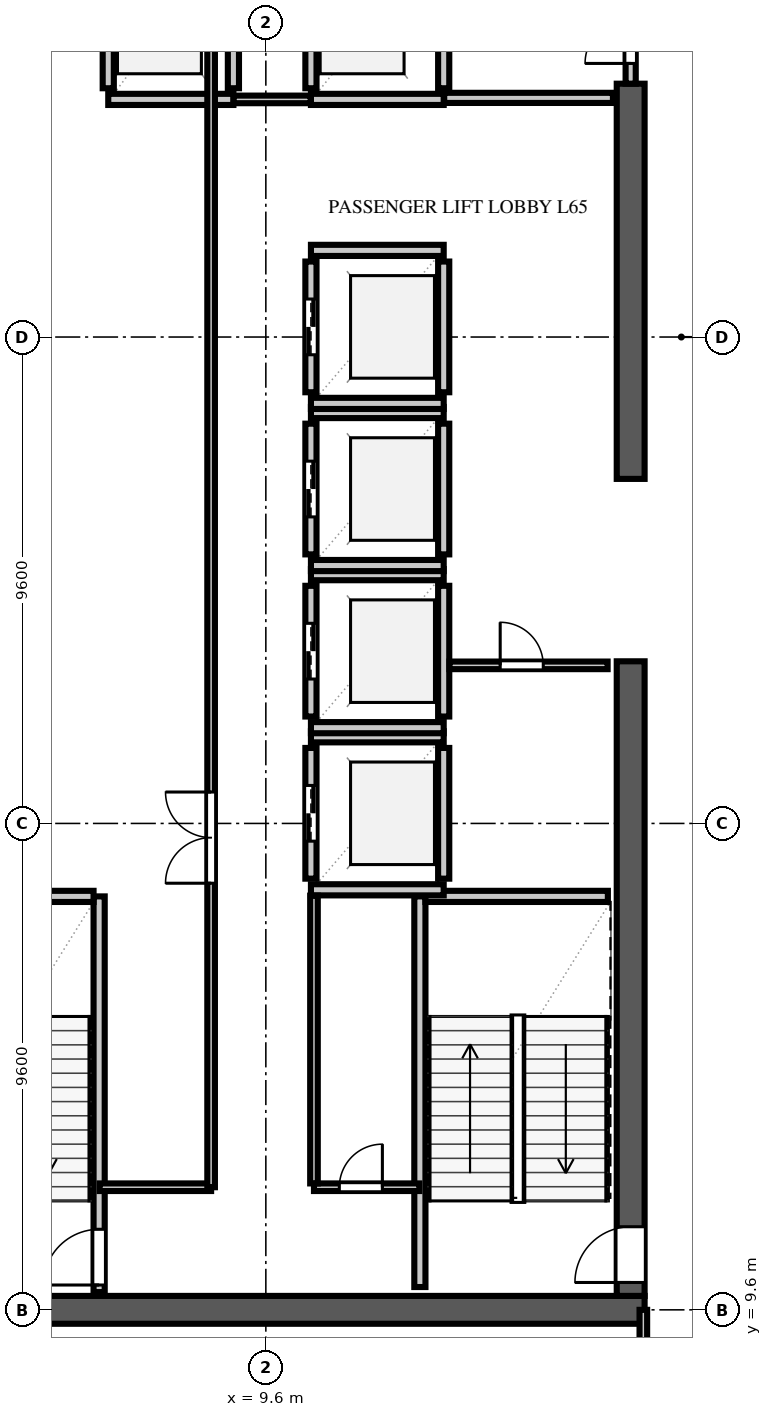
"""IFC4 building model, lengths in metres.
Left out: names, types, materials, properties, quantities, classifications, styles, units other than length and angle.
Written with IfcOpenShell. Run it as: python <this file> out.ifc"""

import sys

from ifc_helpers import new_model, si_unit, direction, frame, frame_2d, origin, place, context, subcontext, project, spatial, rectangle, extrude, element, fill, save


model = new_model("IFC4")
c1 = context("Model", 3, precision=1e-05, world=origin(), true_north=direction((0.0, 1.0)))
c2 = subcontext(c1, "Body", "Model", "MODEL_VIEW")
j1 = project(units=[si_unit("LENGTHUNIT", "METRE"), si_unit("PLANEANGLEUNIT", "RADIAN")], contexts=[c1])
p1 = place(None, origin())
s1 = spatial("IfcSite", under=j1, at=p1, CompositionType="ELEMENT")
p2 = place(p1, origin())
s2 = spatial("IfcBuilding", under=s1, at=p2, CompositionType="ELEMENT")
p3 = place(p2, frame((0.0, 0.0, 256.0)))
s3 = spatial("IfcBuildingStorey", under=s2, at=p3, CompositionType="ELEMENT", Elevation=256.0)
p4 = place(p3, frame((2.475, 9.6, 0.0), z_axis=(0.0, 0.0, 1.0), x_axis=(1.0, 0.0, 0.0)))
e1 = element("IfcWall", 1, at=p4, inside=s3, PredefinedType="SHEAR", context=c2, shape_type="SweptSolid", body=[
    extrude(rectangle(XDim=14.6, YDim=0.55, at=frame_2d((7.3, 0.0))), origin(), (0.0, 0.0, 1.0), 4.74),
])
p5 = place(p3, frame((16.8, 9.875, 0.0), z_axis=(0.0, 0.0, 1.0), x_axis=(0.0, 1.0, 0.0)))
e2 = element("IfcWall", 2, at=p5, inside=s3, PredefinedType="SHEAR", context=c2, shape_type="SweptSolid", body=[
    extrude(rectangle(XDim=12.525, YDim=0.55, at=frame_2d((6.262, 0.0))), origin(), (0.0, 0.0, 1.0), 4.74),
])
p6 = place(p5, frame((0.265, 0.0, 0.0)))
e3 = element("IfcOpeningElement", 3, at=p6, cuts=e2, PredefinedType="OPENING", context=c2, shape_type="SweptSolid", body=[
    extrude(rectangle(XDim=1.1, YDim=2.2, at=frame_2d((0.55, 1.1))), frame((0.0, 0.287, 0.0), z_axis=(0.0, -1.0, 0.0), x_axis=(1.0, 0.0, 0.0)), (0.0, 0.0, 1.0), 0.574),
])
p7 = place(p3, frame((16.8, 26.0, 0.0), z_axis=(0.0, 0.0, 1.0), x_axis=(0.0, 1.0, 0.0)))
e4 = element("IfcWall", 4, at=p7, inside=s3, PredefinedType="SHEAR", context=c2, shape_type="SweptSolid", body=[
    extrude(rectangle(XDim=7.8, YDim=0.55, at=frame_2d((3.9, 0.0))), origin(), (0.0, 0.0, 1.0), 4.74),
])
p8 = place(p3, frame((6.31, 9.95, 0.0), z_axis=(0.0, 0.0, 1.0), x_axis=(0.0, 1.0, 0.0)))
e5 = element("IfcWall", 5, at=p8, inside=s3, PredefinedType="SOLIDWALL", context=c2, shape_type="SweptSolid", body=[
    extrude(rectangle(XDim=7.81, YDim=0.22, at=frame_2d((3.905, 0.0))), origin(), (0.0, 0.0, 1.0), 4.74),
])
p9 = place(p8, frame((0.14, 0.0, 0.0)))
e6 = element("IfcOpeningElement", 6, at=p9, cuts=e5, PredefinedType="OPENING", context=c2, shape_type="SweptSolid", body=[
    extrude(rectangle(XDim=1.1, YDim=2.2, at=frame_2d((0.55, 1.1))), frame((0.0, 0.122, 0.0), z_axis=(0.0, -1.0, 0.0), x_axis=(1.0, 0.0, 0.0)), (0.0, 0.0, 1.0), 0.244),
])
p10 = place(p3, frame((2.65, 17.76, 0.0), z_axis=(0.0, 0.0, 1.0), x_axis=(1.0, 0.0, 0.0)))
e7 = element("IfcWall", 7, at=p10, inside=s3, PredefinedType="SOLIDWALL", context=c2, shape_type="SweptSolid", body=[
    extrude(rectangle(XDim=3.55, YDim=0.22, at=frame_2d((1.775, 0.0))), origin(), (0.0, 0.0, 1.0), 4.74),
])
p11 = place(p3, frame((12.64, 10.05, 0.0), z_axis=(0.0, 0.0, 1.0), x_axis=(0.0, 1.0, 0.0)))
e8 = element("IfcWall", 8, at=p11, inside=s3, PredefinedType="SOLIDWALL", context=c2, shape_type="SweptSolid", body=[
    extrude(rectangle(XDim=7.71, YDim=0.22, at=frame_2d((3.855, 0.0))), origin(), (0.0, 0.0, 1.0), 4.74),
])
p12 = place(p3, frame((12.75, 17.76, 0.0), z_axis=(0.0, 0.0, 1.0), x_axis=(1.0, 0.0, 0.0)))
e9 = element("IfcWall", 9, at=p12, inside=s3, PredefinedType="SOLIDWALL", context=c2, shape_type="SweptSolid", body=[
    extrude(rectangle(XDim=3.6, YDim=0.22, at=frame_2d((1.8, 0.0))), origin(), (0.0, 0.0, 1.0), 4.74),
])
p13 = place(p3, frame((10.49, 18.11, 0.0), z_axis=(0.0, 0.0, 1.0), x_axis=(0.0, 1.0, 0.0)))
e10 = element("IfcWall", 10, at=p13, inside=s3, PredefinedType="SOLIDWALL", context=c2, shape_type="SweptSolid", body=[
    extrude(rectangle(XDim=2.58, YDim=0.22, at=frame_2d((1.29, 0.0))), origin(), (0.0, 0.0, 1.0), 4.74),
])
p14 = place(p13, frame((0.74, 0.0, 0.0)))
e11 = element("IfcOpeningElement", 11, at=p14, cuts=e10, PredefinedType="OPENING", context=c2, shape_type="SweptSolid", body=[
    extrude(rectangle(XDim=1.1, YDim=2.2, at=frame_2d((0.55, 1.1))), frame((0.0, 0.122, 0.0), z_axis=(0.0, -1.0, 0.0), x_axis=(1.0, 0.0, 0.0)), (0.0, 0.0, 1.0), 0.244),
])
p15 = place(p3, frame((13.11, 18.11, 0.0), z_axis=(0.0, 0.0, 1.0), x_axis=(0.0, 1.0, 0.0)))
e12 = element("IfcWall", 12, at=p15, inside=s3, PredefinedType="SOLIDWALL", context=c2, shape_type="SweptSolid", body=[
    extrude(rectangle(XDim=2.58, YDim=0.22, at=frame_2d((1.29, 0.0))), origin(), (0.0, 0.0, 1.0), 4.74),
])
for number, where, z_axis, x_axis in (
    (13, (10.49, 17.89, 0.0), (0.0, 0.0, 1.0), (1.0, 0.0, 0.0)),
    (14, (10.49, 20.91, 0.0), (0.0, 0.0, 1.0), (1.0, 0.0, 0.0)),
):
    element("IfcWall", number, at=place(p3, frame(where, z_axis=z_axis, x_axis=x_axis)), inside=s3, PredefinedType="SOLIDWALL", context=c2, shape_type="SweptSolid", body=[
        extrude(rectangle(XDim=2.62, YDim=0.22, at=frame_2d((1.31, 0.0))), origin(), (0.0, 0.0, 1.0), 4.74),
    ])
p16 = place(p3, frame((10.49, 21.31, 0.0), z_axis=(0.0, 0.0, 1.0), x_axis=(0.0, 1.0, 0.0)))
e15 = element("IfcWall", 15, at=p16, inside=s3, PredefinedType="SOLIDWALL", context=c2, shape_type="SweptSolid", body=[
    extrude(rectangle(XDim=2.58, YDim=0.22, at=frame_2d((1.29, 0.0))), origin(), (0.0, 0.0, 1.0), 4.74),
])
p17 = place(p16, frame((0.74, 0.0, 0.0)))
e16 = element("IfcOpeningElement", 16, at=p17, cuts=e15, PredefinedType="OPENING", context=c2, shape_type="SweptSolid", body=[
    extrude(rectangle(XDim=1.1, YDim=2.2, at=frame_2d((0.55, 1.1))), frame((0.0, 0.122, 0.0), z_axis=(0.0, -1.0, 0.0), x_axis=(1.0, 0.0, 0.0)), (0.0, 0.0, 1.0), 0.244),
])
p18 = place(p3, frame((13.11, 21.31, 0.0), z_axis=(0.0, 0.0, 1.0), x_axis=(0.0, 1.0, 0.0)))
e17 = element("IfcWall", 17, at=p18, inside=s3, PredefinedType="SOLIDWALL", context=c2, shape_type="SweptSolid", body=[
    extrude(rectangle(XDim=2.58, YDim=0.22, at=frame_2d((1.29, 0.0))), origin(), (0.0, 0.0, 1.0), 4.74),
])
for number, where, z_axis, x_axis in (
    (18, (10.49, 21.09, 0.0), (0.0, 0.0, 1.0), (1.0, 0.0, 0.0)),
    (19, (10.49, 24.11, 0.0), (0.0, 0.0, 1.0), (1.0, 0.0, 0.0)),
):
    element("IfcWall", number, at=place(p3, frame(where, z_axis=z_axis, x_axis=x_axis)), inside=s3, PredefinedType="SOLIDWALL", context=c2, shape_type="SweptSolid", body=[
        extrude(rectangle(XDim=2.62, YDim=0.22, at=frame_2d((1.31, 0.0))), origin(), (0.0, 0.0, 1.0), 4.74),
    ])
p19 = place(p3, frame((10.49, 24.51, 0.0), z_axis=(0.0, 0.0, 1.0), x_axis=(0.0, 1.0, 0.0)))
e20 = element("IfcWall", 20, at=p19, inside=s3, PredefinedType="SOLIDWALL", context=c2, shape_type="SweptSolid", body=[
    extrude(rectangle(XDim=2.58, YDim=0.22, at=frame_2d((1.29, 0.0))), origin(), (0.0, 0.0, 1.0), 4.74),
])
p20 = place(p19, frame((0.74, 0.0, 0.0)))
e21 = element("IfcOpeningElement", 21, at=p20, cuts=e20, PredefinedType="OPENING", context=c2, shape_type="SweptSolid", body=[
    extrude(rectangle(XDim=1.1, YDim=2.2, at=frame_2d((0.55, 1.1))), frame((0.0, 0.122, 0.0), z_axis=(0.0, -1.0, 0.0), x_axis=(1.0, 0.0, 0.0)), (0.0, 0.0, 1.0), 0.244),
])
p21 = place(p3, frame((13.11, 24.51, 0.0), z_axis=(0.0, 0.0, 1.0), x_axis=(0.0, 1.0, 0.0)))
e22 = element("IfcWall", 22, at=p21, inside=s3, PredefinedType="SOLIDWALL", context=c2, shape_type="SweptSolid", body=[
    extrude(rectangle(XDim=2.58, YDim=0.22, at=frame_2d((1.29, 0.0))), origin(), (0.0, 0.0, 1.0), 4.74),
])
for number, where, z_axis, x_axis in (
    (23, (10.49, 24.29, 0.0), (0.0, 0.0, 1.0), (1.0, 0.0, 0.0)),
    (24, (10.49, 27.31, 0.0), (0.0, 0.0, 1.0), (1.0, 0.0, 0.0)),
):
    element("IfcWall", number, at=place(p3, frame(where, z_axis=z_axis, x_axis=x_axis)), inside=s3, PredefinedType="SOLIDWALL", context=c2, shape_type="SweptSolid", body=[
        extrude(rectangle(XDim=2.62, YDim=0.22, at=frame_2d((1.31, 0.0))), origin(), (0.0, 0.0, 1.0), 4.74),
    ])
p22 = place(p3, frame((10.49, 27.71, 0.0), z_axis=(0.0, 0.0, 1.0), x_axis=(0.0, 1.0, 0.0)))
e25 = element("IfcWall", 25, at=p22, inside=s3, PredefinedType="SOLIDWALL", context=c2, shape_type="SweptSolid", body=[
    extrude(rectangle(XDim=2.58, YDim=0.22, at=frame_2d((1.29, 0.0))), origin(), (0.0, 0.0, 1.0), 4.74),
])
p23 = place(p22, frame((0.74, 0.0, 0.0)))
e26 = element("IfcOpeningElement", 26, at=p23, cuts=e25, PredefinedType="OPENING", context=c2, shape_type="SweptSolid", body=[
    extrude(rectangle(XDim=1.1, YDim=2.2, at=frame_2d((0.55, 1.1))), frame((0.0, 0.122, 0.0), z_axis=(0.0, -1.0, 0.0), x_axis=(1.0, 0.0, 0.0)), (0.0, 0.0, 1.0), 0.244),
])
p24 = place(p3, frame((13.11, 27.71, 0.0), z_axis=(0.0, 0.0, 1.0), x_axis=(0.0, 1.0, 0.0)))
e27 = element("IfcWall", 27, at=p24, inside=s3, PredefinedType="SOLIDWALL", context=c2, shape_type="SweptSolid", body=[
    extrude(rectangle(XDim=2.58, YDim=0.22, at=frame_2d((1.29, 0.0))), origin(), (0.0, 0.0, 1.0), 4.74),
])
for number, where, z_axis, x_axis in (
    (28, (10.49, 27.49, 0.0), (0.0, 0.0, 1.0), (1.0, 0.0, 0.0)),
    (29, (10.49, 30.51, 0.0), (0.0, 0.0, 1.0), (1.0, 0.0, 0.0)),
):
    element("IfcWall", number, at=place(p3, frame(where, z_axis=z_axis, x_axis=x_axis)), inside=s3, PredefinedType="SOLIDWALL", context=c2, shape_type="SweptSolid", body=[
        extrude(rectangle(XDim=2.62, YDim=0.22, at=frame_2d((1.31, 0.0))), origin(), (0.0, 0.0, 1.0), 4.74),
    ])
for number, where, z_axis, x_axis in (
    (30, (6.49, 33.71, 0.0), (0.0, 0.0, 1.0), (0.0, 1.0, 0.0)),
    (31, (8.96, 33.71, 0.0), (0.0, 0.0, 1.0), (0.0, 1.0, 0.0)),
):
    element("IfcWall", number, at=place(p3, frame(where, z_axis=z_axis, x_axis=x_axis)), inside=s3, PredefinedType="SOLIDWALL", context=c2, shape_type="SweptSolid", body=[
        extrude(rectangle(XDim=2.78, YDim=0.22, at=frame_2d((1.39, 0.0))), origin(), (0.0, 0.0, 1.0), 4.74),
    ])
p25 = place(p3, frame((6.49, 33.49, 0.0), z_axis=(0.0, 0.0, 1.0), x_axis=(1.0, 0.0, 0.0)))
e32 = element("IfcWall", 32, at=p25, inside=s3, PredefinedType="SOLIDWALL", context=c2, shape_type="SweptSolid", body=[
    extrude(rectangle(XDim=2.47, YDim=0.22, at=frame_2d((1.235, 0.0))), origin(), (0.0, 0.0, 1.0), 4.74),
])
for number, where, z_axis, x_axis in (
    (33, (10.49, 33.71, 0.0), (0.0, 0.0, 1.0), (0.0, 1.0, 0.0)),
    (34, (13.11, 33.71, 0.0), (0.0, 0.0, 1.0), (0.0, 1.0, 0.0)),
):
    element("IfcWall", number, at=place(p3, frame(where, z_axis=z_axis, x_axis=x_axis)), inside=s3, PredefinedType="SOLIDWALL", context=c2, shape_type="SweptSolid", body=[
        extrude(rectangle(XDim=2.78, YDim=0.22, at=frame_2d((1.39, 0.0))), origin(), (0.0, 0.0, 1.0), 4.74),
    ])
p26 = place(p3, frame((10.49, 33.49, 0.0), z_axis=(0.0, 0.0, 1.0), x_axis=(1.0, 0.0, 0.0)))
e35 = element("IfcWall", 35, at=p26, inside=s3, PredefinedType="SOLIDWALL", context=c2, shape_type="SweptSolid", body=[
    extrude(rectangle(XDim=2.62, YDim=0.22, at=frame_2d((1.31, 0.0))), origin(), (0.0, 0.0, 1.0), 4.74),
])
p27 = place(p3, frame((13.12, 33.52, 0.0), z_axis=(0.0, 0.0, 1.0), x_axis=(1.0, 0.0, 0.0)))
e36 = element("IfcWall", 36, at=p27, inside=s3, PredefinedType="SOLIDWALL", context=c2, shape_type="SweptSolid", body=[
    extrude(rectangle(XDim=3.33, YDim=0.2, at=frame_2d((1.665, 0.0))), origin(), (0.0, 0.0, 1.0), 4.74),
])
p28 = place(p3, frame((16.8, 33.8, 0.0), z_axis=(0.0, 0.0, 1.0), x_axis=(0.0, 1.0, 0.0)))
e37 = element("IfcWall", 37, at=p28, inside=s3, PredefinedType="SOLIDWALL", context=c2, shape_type="SweptSolid", body=[
    extrude(rectangle(XDim=2.6, YDim=0.2, at=frame_2d((1.3, 0.0))), origin(), (0.0, 0.0, 1.0), 4.74),
])
p29 = place(p28, frame((0.4, 0.0, 0.0)))
e38 = element("IfcOpeningElement", 38, at=p29, cuts=e37, PredefinedType="OPENING", context=c2, shape_type="SweptSolid", body=[
    extrude(rectangle(XDim=1.8, YDim=2.2, at=frame_2d((0.9, 1.1))), frame((0.0, 0.112, 0.0), z_axis=(0.0, -1.0, 0.0), x_axis=(1.0, 0.0, 0.0)), (0.0, 0.0, 1.0), 0.224),
])
p30 = place(p3, frame((8.965, 33.49, 0.0), z_axis=(0.0, 0.0, 1.0), x_axis=(1.0, 0.0, 0.0)))
e39 = element("IfcWall", 39, at=p30, inside=s3, PredefinedType="PARTITIONING", context=c2, shape_type="SweptSolid", body=[
    extrude(rectangle(XDim=1.52, YDim=0.15, at=frame_2d((0.76, 0.0))), origin(), (0.0, 0.0, 1.0), 4.74),
])
p31 = place(p3, frame((10.55, 12.02, 0.0), z_axis=(0.0, 0.0, 1.0), x_axis=(1.0, 0.0, 0.0)))
e40 = element("IfcWall", 40, at=p31, inside=s3, PredefinedType="PARTITIONING", context=c2, shape_type="SweptSolid", body=[
    extrude(rectangle(XDim=2.08, YDim=0.15, at=frame_2d((1.04, 0.0))), origin(), (0.0, 0.0, 1.0), 4.74),
])
p32 = place(p31, frame((0.5, 0.0, 0.0)))
e41 = element("IfcOpeningElement", 41, at=p32, cuts=e40, PredefinedType="OPENING", context=c2, shape_type="SweptSolid", body=[
    extrude(rectangle(XDim=0.85, YDim=2.1, at=frame_2d((0.425, 1.05))), frame((0.0, 0.087, 0.0), z_axis=(0.0, -1.0, 0.0), x_axis=(1.0, 0.0, 0.0)), (0.0, 0.0, 1.0), 0.174),
])
p33 = place(p3, frame((10.55, 12.095, 0.0), z_axis=(0.0, 0.0, 1.0), x_axis=(0.0, 1.0, 0.0)))
e42 = element("IfcWall", 42, at=p33, inside=s3, PredefinedType="PARTITIONING", context=c2, shape_type="SweptSolid", body=[
    extrude(rectangle(XDim=5.68, YDim=0.15, at=frame_2d((2.84, 0.0))), origin(), (0.0, 0.0, 1.0), 4.74),
])
p34 = place(p3, frame((13.225, 22.32, 0.0), z_axis=(0.0, 0.0, 1.0), x_axis=(1.0, 0.0, 0.0)))
e43 = element("IfcWall", 43, at=p34, inside=s3, PredefinedType="PARTITIONING", context=c2, shape_type="SweptSolid", body=[
    extrude(rectangle(XDim=3.12, YDim=0.15, at=frame_2d((1.56, 0.0))), origin(), (0.0, 0.0, 1.0), 4.74),
])
p35 = place(p34, frame((1.0, 0.0, 0.0)))
e44 = element("IfcOpeningElement", 44, at=p35, cuts=e43, PredefinedType="OPENING", context=c2, shape_type="SweptSolid", body=[
    extrude(rectangle(XDim=0.85, YDim=2.1, at=frame_2d((0.425, 1.05))), frame((0.0, 0.087, 0.0), z_axis=(0.0, -1.0, 0.0), x_axis=(1.0, 0.0, 0.0)), (0.0, 0.0, 1.0), 0.174),
])
p36 = place(p3, frame((6.32, 12.02, 0.0), z_axis=(0.0, 0.0, 1.0), x_axis=(1.0, 0.0, 0.0)))
e45 = element("IfcWall", 45, at=p36, inside=s3, PredefinedType="PARTITIONING", context=c2, shape_type="SweptSolid", body=[
    extrude(rectangle(XDim=2.2, YDim=0.15, at=frame_2d((1.1, 0.0))), origin(), (0.0, 0.0, 1.0), 4.74),
])
p37 = place(p3, frame((8.52, 12.02, 0.0), z_axis=(0.0, 0.0, 1.0), x_axis=(0.0, 1.0, 0.0)))
e46 = element("IfcWall", 46, at=p37, inside=s3, PredefinedType="PARTITIONING", context=c2, shape_type="SweptSolid", body=[
    extrude(rectangle(XDim=24.76, YDim=0.15, at=frame_2d((12.38, 0.0))), origin(), (0.0, 0.0, 1.0), 4.74),
])
p38 = place(p37, frame((6.0, 0.0, 0.0)))
e47 = element("IfcOpeningElement", 47, at=p38, cuts=e46, PredefinedType="OPENING", context=c2, shape_type="SweptSolid", body=[
    extrude(rectangle(XDim=1.8, YDim=2.2, at=frame_2d((0.9, 1.1))), frame((0.0, 0.087, 0.0), z_axis=(0.0, -1.0, 0.0), x_axis=(1.0, 0.0, 0.0)), (0.0, 0.0, 1.0), 0.174),
])
p39 = place(p3, frame((17.05, 7.6, 0.0), z_axis=(0.0, 0.0, 1.0), x_axis=(0.0, 1.0, 0.0)))
e48 = element("IfcWall", 48, at=p39, inside=s3, PredefinedType="PARTITIONING", context=c2, shape_type="SweptSolid", body=[
    extrude(rectangle(XDim=2.0, YDim=0.15, at=frame_2d((1.0, 0.0))), origin(), (0.0, 0.0, 1.0), 4.74),
])
p40 = place(p9, origin())
e49 = element("IfcDoor", 49, at=p40, inside=s3, OperationType="SINGLE_SWING_LEFT", PredefinedType="DOOR", context=c2, shape_type="SweptSolid", body=[
    extrude(rectangle(XDim=1.1, YDim=2.2, at=frame_2d((0.55, 1.1))), frame((0.0, 0.025, 0.0), z_axis=(0.0, -1.0, 0.0), x_axis=(1.0, 0.0, 0.0)), (0.0, 0.0, 1.0), 0.05),
])
fill(e6, e49)
p41 = place(p6, origin())
e50 = element("IfcDoor", 50, at=p41, inside=s3, OperationType="SINGLE_SWING_LEFT", PredefinedType="DOOR", context=c2, shape_type="SweptSolid", body=[
    extrude(rectangle(XDim=1.1, YDim=2.2, at=frame_2d((0.55, 1.1))), frame((0.0, 0.025, 0.0), z_axis=(0.0, -1.0, 0.0), x_axis=(1.0, 0.0, 0.0)), (0.0, 0.0, 1.0), 0.05),
])
fill(e3, e50)
p42 = place(p14, origin())
e51 = element("IfcDoor", 51, at=p42, inside=s3, OperationType="DOUBLE_DOOR_SLIDING", PredefinedType="DOOR", context=c2, shape_type="SweptSolid", body=[
    extrude(rectangle(XDim=1.1, YDim=2.2, at=frame_2d((0.55, 1.1))), frame((0.0, 0.025, 0.0), z_axis=(0.0, -1.0, 0.0), x_axis=(1.0, 0.0, 0.0)), (0.0, 0.0, 1.0), 0.05),
])
fill(e11, e51)
p43 = place(p17, origin())
e52 = element("IfcDoor", 52, at=p43, inside=s3, OperationType="DOUBLE_DOOR_SLIDING", PredefinedType="DOOR", context=c2, shape_type="SweptSolid", body=[
    extrude(rectangle(XDim=1.1, YDim=2.2, at=frame_2d((0.55, 1.1))), frame((0.0, 0.025, 0.0), z_axis=(0.0, -1.0, 0.0), x_axis=(1.0, 0.0, 0.0)), (0.0, 0.0, 1.0), 0.05),
])
fill(e16, e52)
p44 = place(p20, origin())
e53 = element("IfcDoor", 53, at=p44, inside=s3, OperationType="DOUBLE_DOOR_SLIDING", PredefinedType="DOOR", context=c2, shape_type="SweptSolid", body=[
    extrude(rectangle(XDim=1.1, YDim=2.2, at=frame_2d((0.55, 1.1))), frame((0.0, 0.025, 0.0), z_axis=(0.0, -1.0, 0.0), x_axis=(1.0, 0.0, 0.0)), (0.0, 0.0, 1.0), 0.05),
])
fill(e21, e53)
p45 = place(p23, origin())
e54 = element("IfcDoor", 54, at=p45, inside=s3, OperationType="DOUBLE_DOOR_SLIDING", PredefinedType="DOOR", context=c2, shape_type="SweptSolid", body=[
    extrude(rectangle(XDim=1.1, YDim=2.2, at=frame_2d((0.55, 1.1))), frame((0.0, 0.025, 0.0), z_axis=(0.0, -1.0, 0.0), x_axis=(1.0, 0.0, 0.0)), (0.0, 0.0, 1.0), 0.05),
])
fill(e26, e54)
p46 = place(p29, origin())
e55 = element("IfcDoor", 55, at=p46, inside=s3, OperationType="DOUBLE_DOOR_SINGLE_SWING", PredefinedType="DOOR", context=c2, shape_type="SweptSolid", body=[
    extrude(rectangle(XDim=1.8, YDim=2.2, at=frame_2d((0.9, 1.1))), frame((0.0, 0.025, 0.0), z_axis=(0.0, -1.0, 0.0), x_axis=(1.0, 0.0, 0.0)), (0.0, 0.0, 1.0), 0.05),
])
fill(e38, e55)
p47 = place(p32, origin())
e56 = element("IfcDoor", 56, at=p47, inside=s3, OperationType="SINGLE_SWING_RIGHT", PredefinedType="DOOR", context=c2, shape_type="SweptSolid", body=[
    extrude(rectangle(XDim=0.85, YDim=2.1, at=frame_2d((0.425, 1.05))), frame((0.0, 0.025, 0.0), z_axis=(0.0, -1.0, 0.0), x_axis=(1.0, 0.0, 0.0)), (0.0, 0.0, 1.0), 0.05),
])
fill(e41, e56)
p48 = place(p35, origin())
e57 = element("IfcDoor", 57, at=p48, inside=s3, OperationType="SINGLE_SWING_LEFT", PredefinedType="DOOR", context=c2, shape_type="SweptSolid", body=[
    extrude(rectangle(XDim=0.85, YDim=2.1, at=frame_2d((0.425, 1.05))), frame((0.0, 0.025, 0.0), z_axis=(0.0, -1.0, 0.0), x_axis=(1.0, 0.0, 0.0)), (0.0, 0.0, 1.0), 0.05),
])
fill(e44, e57)
p49 = place(p38, origin())
e58 = element("IfcDoor", 58, at=p49, inside=s3, OperationType="DOUBLE_DOOR_SINGLE_SWING", PredefinedType="DOOR", context=c2, shape_type="SweptSolid", body=[
    extrude(rectangle(XDim=1.8, YDim=2.2, at=frame_2d((0.9, 1.1))), frame((0.0, 0.025, 0.0), z_axis=(0.0, -1.0, 0.0), x_axis=(1.0, 0.0, 0.0)), (0.0, 0.0, 1.0), 0.05),
])
fill(e47, e58)
save(model, sys.argv[1])
